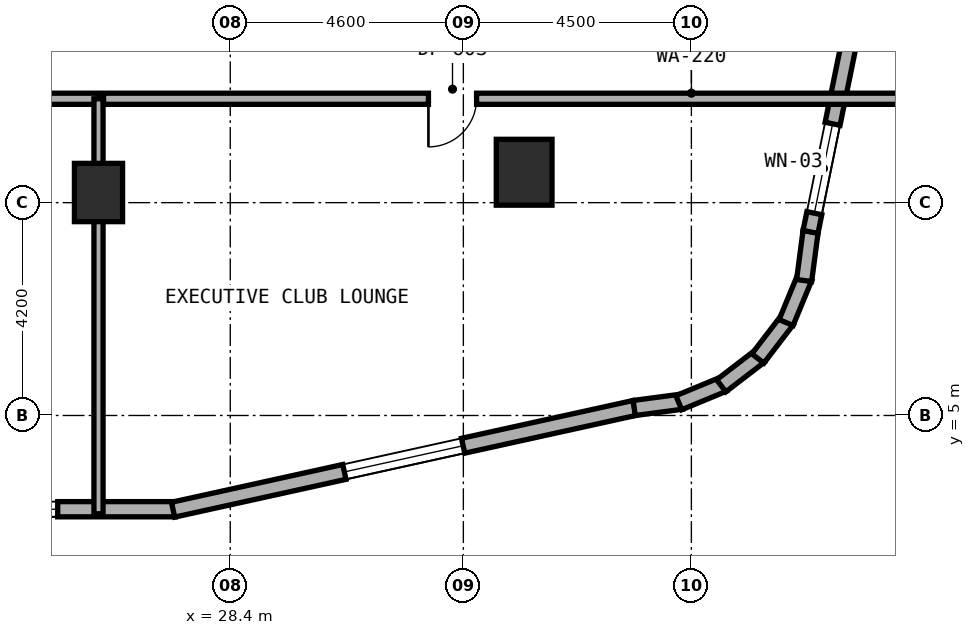
"""IFC4 building model, lengths in metres.
Left out: names, types, materials, properties, quantities, classifications, styles, units other than length and angle.
Written with IfcOpenShell. Run it as: python <this file> out.ifc"""

import sys

from ifc_helpers import new_model, si_unit, direction, frame, frame_2d, origin, origin_2d, place, context, subcontext, project, spatial, rectangle, extrude, element, fill, save


model = new_model("IFC4")
c1 = context("Model", 3, precision=1e-05, world=origin(), true_north=direction((0.0, 1.0)))
c2 = subcontext(c1, "Body", "Model", "MODEL_VIEW")
j1 = project(units=[si_unit("LENGTHUNIT", "METRE"), si_unit("PLANEANGLEUNIT", "RADIAN")], contexts=[c1])
p1 = place(None, origin())
s1 = spatial("IfcSite", under=j1, at=p1, CompositionType="ELEMENT")
p2 = place(p1, origin())
s2 = spatial("IfcBuilding", under=s1, at=p2, CompositionType="ELEMENT")
p3 = place(p2, frame((0.0, 0.0, 27.5)))
s3 = spatial("IfcBuildingStorey", under=s2, at=p3, CompositionType="ELEMENT", Elevation=27.5)
p4 = place(p3, frame((25.8, 9.4, 0.0), z_axis=(0.0, 0.0, 1.0), x_axis=(1.0, 0.0, 0.0)))
e1 = element("IfcColumn", 1, at=p4, inside=s3, PredefinedType="COLUMN", context=c2, shape_type="SweptSolid", body=[
    extrude(rectangle(XDim=0.95, YDim=1.15, at=origin_2d()), origin(), (0.0, 0.0, 1.0), 3.5),
])
p5 = place(p3, frame((34.2, 9.8, 0.0), z_axis=(0.0, 0.0, 1.0), x_axis=(1.0, 0.0, 0.0)))
e2 = element("IfcColumn", 2, at=p5, inside=s3, PredefinedType="COLUMN", context=c2, shape_type="SweptSolid", body=[
    extrude(rectangle(XDim=1.1, YDim=1.3, at=origin_2d()), origin(), (0.0, 0.0, 1.0), 3.5),
])
p6 = place(p3, frame((14.727, 3.15, 0.0), z_axis=(0.0, 0.0, 1.0), x_axis=(1.0, 0.0, 0.0)))
e3 = element("IfcWall", 3, at=p6, inside=s3, PredefinedType="STANDARD", context=c2, shape_type="SweptSolid", body=[
    extrude(rectangle(XDim=12.591, YDim=0.3, at=frame_2d((6.295, 0.0))), origin(), (0.0, 0.0, 1.0), 3.22),
])
p7 = place(p6, frame((5.713, 0.0, 0.0)))
e4 = element("IfcOpeningElement", 4, at=p7, cuts=e3, PredefinedType="OPENING", context=c2, shape_type="SweptSolid", body=[
    extrude(rectangle(XDim=1.2, YDim=2.15, at=frame_2d((0.6, 1.075))), frame((0.0, 0.16, 0.0), z_axis=(0.0, -1.0, 0.0), x_axis=(1.0, 0.0, 0.0)), (0.0, 0.0, 1.0), 0.32),
])
p8 = place(p6, frame((1.552, 0.0, 0.8)))
e5 = element("IfcOpeningElement", 5, at=p8, cuts=e3, PredefinedType="OPENING", context=c2, shape_type="SweptSolid", body=[
    extrude(rectangle(XDim=2.4, YDim=1.6, at=frame_2d((1.2, 0.8))), frame((0.0, 0.16, 0.0), z_axis=(0.0, -1.0, 0.0), x_axis=(1.0, 0.0, 0.0)), (0.0, 0.0, 1.0), 0.32),
])
p9 = place(p6, frame((7.868, 0.0, 0.8)))
e6 = element("IfcOpeningElement", 6, at=p9, cuts=e3, PredefinedType="OPENING", context=c2, shape_type="SweptSolid", body=[
    extrude(rectangle(XDim=2.4, YDim=1.6, at=frame_2d((1.2, 0.8))), frame((0.0, 0.16, 0.0), z_axis=(0.0, -1.0, 0.0), x_axis=(1.0, 0.0, 0.0)), (0.0, 0.0, 1.0), 0.32),
])
p10 = place(p3, frame((27.272, 3.141, 0.0), z_axis=(0.0, 0.0, 1.0), x_axis=(0.976555357219, 0.21526642629, 0.0)))
e7 = element("IfcWall", 7, at=p10, inside=s3, PredefinedType="STANDARD", context=c2, shape_type="SweptSolid", body=[
    extrude(rectangle(XDim=9.323, YDim=0.3, at=frame_2d((4.661, 0.0))), origin(), (0.0, 0.0, 1.0), 3.22),
])
p11 = place(p10, frame((3.461, 0.0, 0.8)))
e8 = element("IfcOpeningElement", 8, at=p11, cuts=e7, PredefinedType="OPENING", context=c2, shape_type="SweptSolid", body=[
    extrude(rectangle(XDim=2.4, YDim=1.6, at=frame_2d((1.2, 0.8))), frame((0.0, 0.16, 0.0), z_axis=(0.0, -1.0, 0.0), x_axis=(1.0, 0.0, 0.0)), (0.0, 0.0, 1.0), 0.32),
])
p12 = place(p3, frame((36.372, 5.148, 0.0), z_axis=(0.0, 0.0, 1.0), x_axis=(0.991359246108, 0.131174864804, 0.0)))
e9 = element("IfcWall", 9, at=p12, inside=s3, PredefinedType="STANDARD", context=c2, shape_type="SweptSolid", body=[
    extrude(rectangle(XDim=0.938, YDim=0.3, at=frame_2d((0.469, 0.0))), origin(), (0.0, 0.0, 1.0), 3.22),
])
p13 = place(p3, frame((37.252, 5.252, 0.0), z_axis=(0.0, 0.0, 1.0), x_axis=(0.924019948111, 0.382344263057, 0.0)))
e10 = element("IfcWall", 10, at=p13, inside=s3, PredefinedType="STANDARD", context=c2, shape_type="SweptSolid", body=[
    extrude(rectangle(XDim=0.955, YDim=0.3, at=frame_2d((0.477, 0.0))), origin(), (0.0, 0.0, 1.0), 3.22),
])
p14 = place(p3, frame((38.089, 5.586, 0.0), z_axis=(0.0, 0.0, 1.0), x_axis=(0.793573440799, 0.608474481025, 0.0)))
e11 = element("IfcWall", 11, at=p14, inside=s3, PredefinedType="STANDARD", context=c2, shape_type="SweptSolid", body=[
    extrude(rectangle(XDim=0.955, YDim=0.3, at=frame_2d((0.478, 0.0))), origin(), (0.0, 0.0, 1.0), 3.22),
])
p15 = place(p3, frame((38.812, 6.125, 0.0), z_axis=(0.0, 0.0, 1.0), x_axis=(0.608351047625, 0.793668068435, 0.0)))
e12 = element("IfcWall", 12, at=p15, inside=s3, PredefinedType="STANDARD", context=c2, shape_type="SweptSolid", body=[
    extrude(rectangle(XDim=0.955, YDim=0.3, at=frame_2d((0.478, 0.0))), origin(), (0.0, 0.0, 1.0), 3.22),
])
p16 = place(p3, frame((39.369, 6.834, 0.0), z_axis=(0.0, 0.0, 1.0), x_axis=(0.382344263057, 0.924019948111, 0.0)))
e13 = element("IfcWall", 13, at=p16, inside=s3, PredefinedType="STANDARD", context=c2, shape_type="SweptSolid", body=[
    extrude(rectangle(XDim=0.955, YDim=0.3, at=frame_2d((0.477, 0.0))), origin(), (0.0, 0.0, 1.0), 3.22),
])
p17 = place(p3, frame((39.725, 7.663, 0.0), z_axis=(0.0, 0.0, 1.0), x_axis=(0.130454512571, 0.991454295543, 0.0)))
e14 = element("IfcWall", 14, at=p17, inside=s3, PredefinedType="STANDARD", context=c2, shape_type="SweptSolid", body=[
    extrude(rectangle(XDim=0.973, YDim=0.3, at=frame_2d((0.487, 0.0))), origin(), (0.0, 0.0, 1.0), 3.22),
])
p18 = place(p3, frame((39.851, 8.622, 0.0), z_axis=(0.0, 0.0, 1.0), x_axis=(0.199990901713, 0.979797754249, 0.0)))
e15 = element("IfcWall", 15, at=p18, inside=s3, PredefinedType="STANDARD", context=c2, shape_type="SweptSolid", body=[
    extrude(rectangle(XDim=10.065, YDim=0.3, at=frame_2d((5.033, 0.0))), origin(), (0.0, 0.0, 1.0), 3.22),
])
p19 = place(p18, frame((0.378, 0.0, 0.85)))
e16 = element("IfcOpeningElement", 16, at=p19, cuts=e15, PredefinedType="OPENING", context=c2, shape_type="SweptSolid", body=[
    extrude(rectangle(XDim=1.8, YDim=1.5, at=frame_2d((0.9, 0.75))), frame((0.0, 0.16, 0.0), z_axis=(0.0, -1.0, 0.0), x_axis=(1.0, 0.0, 0.0)), (0.0, 0.0, 1.0), 0.32),
])
p20 = place(p18, frame((5.236, 0.0, 0.8)))
e17 = element("IfcOpeningElement", 17, at=p20, cuts=e15, PredefinedType="OPENING", context=c2, shape_type="SweptSolid", body=[
    extrude(rectangle(XDim=2.4, YDim=1.6, at=frame_2d((1.2, 0.8))), frame((0.0, 0.16, 0.0), z_axis=(0.0, -1.0, 0.0), x_axis=(1.0, 0.0, 0.0)), (0.0, 0.0, 1.0), 0.32),
])
p21 = place(p3, frame((10.0, 11.25, 0.0), z_axis=(0.0, 0.0, 1.0), x_axis=(1.0, 0.0, 0.0)))
e18 = element("IfcWall", 18, at=p21, inside=s3, PredefinedType="SOLIDWALL", context=c2, shape_type="SweptSolid", body=[
    extrude(rectangle(XDim=15.8, YDim=0.22, at=frame_2d((7.9, 0.0))), origin(), (0.0, 0.0, 1.0), 2.395),
])
p22 = place(p21, frame((7.425, 0.0, 0.0)))
e19 = element("IfcOpeningElement", 19, at=p22, cuts=e18, PredefinedType="OPENING", context=c2, shape_type="SweptSolid", body=[
    extrude(rectangle(XDim=0.95, YDim=2.1, at=frame_2d((0.475, 1.05))), frame((0.0, 0.12, 0.0), z_axis=(0.0, -1.0, 0.0), x_axis=(1.0, 0.0, 0.0)), (0.0, 0.0, 1.0), 0.24),
])
p23 = place(p3, frame((25.8, 3.06, 0.0), z_axis=(0.0, 0.0, 1.0), x_axis=(0.0, 1.0, 0.0)))
e20 = element("IfcWall", 20, at=p23, inside=s3, PredefinedType="SOLIDWALL", context=c2, shape_type="SweptSolid", body=[
    extrude(rectangle(XDim=8.19, YDim=0.18, at=frame_2d((4.095, 0.0))), origin(), (0.0, 0.0, 1.0), 2.395),
])
p24 = place(p3, frame((25.9, 11.25, 0.0), z_axis=(0.0, 0.0, 1.0), x_axis=(1.0, 0.0, 0.0)))
e21 = element("IfcWall", 21, at=p24, inside=s3, PredefinedType="SOLIDWALL", context=c2, shape_type="SweptSolid", body=[
    extrude(rectangle(XDim=15.84, YDim=0.22, at=frame_2d((7.92, 0.0))), origin(), (0.0, 0.0, 1.0), 2.395),
])
p25 = place(p24, frame((6.411, 0.0, 0.0)))
e22 = element("IfcOpeningElement", 22, at=p25, cuts=e21, PredefinedType="OPENING", context=c2, shape_type="SweptSolid", body=[
    extrude(rectangle(XDim=0.95, YDim=2.1, at=frame_2d((0.475, 1.05))), frame((0.0, 0.12, 0.0), z_axis=(0.0, -1.0, 0.0), x_axis=(1.0, 0.0, 0.0)), (0.0, 0.0, 1.0), 0.24),
])
p26 = place(p9, origin())
e23 = element("IfcWindow", 23, at=p26, inside=s3, PartitioningType="SINGLE_PANEL", PredefinedType="WINDOW", context=c2, shape_type="SweptSolid", body=[
    extrude(rectangle(XDim=2.4, YDim=1.6, at=frame_2d((1.2, 0.8))), frame((0.0, 0.03, 0.0), z_axis=(0.0, -1.0, 0.0), x_axis=(1.0, 0.0, 0.0)), (0.0, 0.0, 1.0), 0.06),
])
fill(e6, e23)
p27 = place(p11, origin())
e24 = element("IfcWindow", 24, at=p27, inside=s3, PartitioningType="SINGLE_PANEL", PredefinedType="WINDOW", context=c2, shape_type="SweptSolid", body=[
    extrude(rectangle(XDim=2.4, YDim=1.6, at=frame_2d((1.2, 0.8))), frame((0.0, 0.03, 0.0), z_axis=(0.0, -1.0, 0.0), x_axis=(1.0, 0.0, 0.0)), (0.0, 0.0, 1.0), 0.06),
])
fill(e8, e24)
p28 = place(p19, origin())
e25 = element("IfcWindow", 25, at=p28, inside=s3, PartitioningType="SINGLE_PANEL", PredefinedType="WINDOW", context=c2, shape_type="SweptSolid", body=[
    extrude(rectangle(XDim=1.8, YDim=1.5, at=frame_2d((0.9, 0.75))), frame((0.0, 0.03, 0.0), z_axis=(0.0, -1.0, 0.0), x_axis=(1.0, 0.0, 0.0)), (0.0, 0.0, 1.0), 0.06),
])
fill(e16, e25)
p29 = place(p25, frame((0.95, 0.0, 0.0), z_axis=(0.0, 0.0, 1.0), x_axis=(-1.0, 0.0, 0.0)))
e26 = element("IfcDoor", 26, at=p29, inside=s3, OperationType="SINGLE_SWING_RIGHT", PredefinedType="DOOR", context=c2, shape_type="SweptSolid", body=[
    extrude(rectangle(XDim=0.95, YDim=2.1, at=frame_2d((0.475, 1.05))), frame((0.0, 0.025, 0.0), z_axis=(0.0, -1.0, 0.0), x_axis=(1.0, 0.0, 0.0)), (0.0, 0.0, 1.0), 0.05),
])
fill(e22, e26)
save(model, sys.argv[1])
